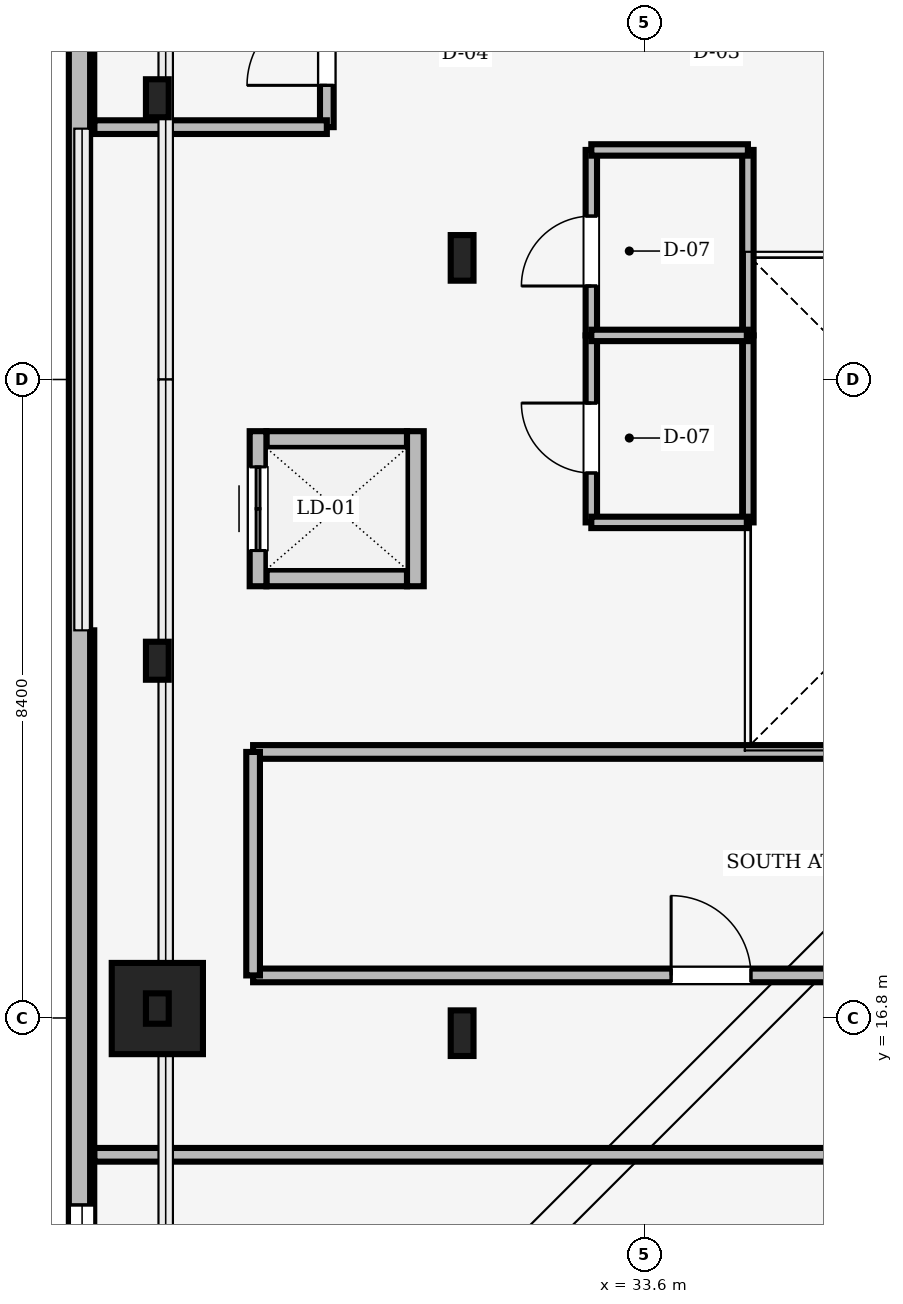
"""IFC4 building model, lengths in metres.
Left out: names, types, materials, properties, quantities, classifications, styles, units other than length and angle.
Written with IfcOpenShell. Run it as: python <this file> out.ifc"""

import sys

from ifc_helpers import new_model, si_unit, direction, frame, frame_2d, origin, origin_2d, place, context, subcontext, project, spatial, rectangle, i_section, extrude, source, transform, mapped, element, fill, save


model = new_model("IFC4")
c1 = context("Model", 3, precision=1e-05, world=origin(), true_north=direction((0.0, 1.0)))
c2 = subcontext(c1, "Body", "Model", "MODEL_VIEW")
j1 = project(units=[si_unit("LENGTHUNIT", "METRE"), si_unit("PLANEANGLEUNIT", "RADIAN")], contexts=[c1])
p1 = place(None, origin())
s1 = spatial("IfcSite", under=j1, at=p1, CompositionType="ELEMENT")
p2 = place(p1, origin())
s2 = spatial("IfcBuilding", under=s1, at=p2, CompositionType="ELEMENT")
p3 = place(p2, frame((0.0, 0.0, 301.15)))
s3 = spatial("IfcBuildingStorey", under=s2, at=p3, CompositionType="ELEMENT", Elevation=301.15)
m1 = source(origin(), c2, "Body", "SweptSolid", [
    extrude(i_section(OverallWidth=0.3, OverallDepth=0.6, WebThickness=0.015, FlangeThickness=0.03, FilletRadius=0.027, at=origin_2d()), origin(), (0.0, 0.0, 1.0), 4.6),
])
for number, where, z_axis, x_axis in (
    (1, (31.2, 16.6, 0.0), (0.0, 0.0, 1.0), (1.0, 0.0, 0.0)),
    (2, (31.2, 26.8, 0.0), (0.0, 0.0, 1.0), (1.0, 0.0, 0.0)),
):
    element("IfcColumn", number, at=place(p3, frame(where, z_axis=z_axis, x_axis=x_axis)), inside=s3, PredefinedType="COLUMN", context=c2, shape_type="MappedRepresentation", body=[
        mapped(m1, transform((0.0, 0.0, 0.0), scale=1.0)),
    ])
m2 = source(origin(), c2, "Body", "SweptSolid", [
    extrude(rectangle(XDim=1.2, YDim=1.2, at=origin_2d()), origin(), (0.0, 0.0, 1.0), 4.6),
])
p4 = place(p3, frame((27.19, 16.924, 0.0), z_axis=(0.0, 0.0, 1.0), x_axis=(1.0, 0.0, 0.0)))
e3 = element("IfcColumn", 3, at=p4, inside=s3, PredefinedType="COLUMN", context=c2, shape_type="MappedRepresentation", body=[
    mapped(m2, transform((0.0, 0.0, 0.0), scale=1.0)),
])
m3 = source(origin(), c2, "Body", "SweptSolid", [
    extrude(i_section(OverallWidth=0.3, OverallDepth=0.5, WebThickness=0.014, FlangeThickness=0.028, FilletRadius=0.027, at=origin_2d()), origin(), (0.0, 0.0, 1.0), 4.6),
])
for number, where, z_axis, x_axis in (
    (4, (27.19, 28.9, 0.0), (0.0, 0.0, 1.0), (1.0, 0.0, 0.0)),
    (5, (27.19, 21.5, 0.0), (0.0, 0.0, 1.0), (1.0, 0.0, 0.0)),
):
    element("IfcColumn", number, at=place(p3, frame(where, z_axis=z_axis, x_axis=x_axis)), inside=s3, PredefinedType="COLUMN", context=c2, shape_type="MappedRepresentation", body=[
        mapped(m3, transform((0.0, 0.0, 0.0), scale=1.0)),
    ])
m4 = source(origin(), c2, "Body", "SweptSolid", [
    extrude(i_section(OverallWidth=0.3, OverallDepth=0.4, WebThickness=0.013, FlangeThickness=0.024, FilletRadius=0.027, at=origin_2d()), origin(), (0.0, 0.0, 1.0), 12.85),
])
p5 = place(p3, frame((27.19, 16.924, 5.0), z_axis=(0.0, 0.0, 1.0), x_axis=(1.0, 0.0, 0.0)))
e6 = element("IfcColumn", 6, at=p5, inside=s3, PredefinedType="COLUMN", context=c2, shape_type="MappedRepresentation", body=[
    mapped(m4, transform((0.0, 0.0, 0.0), scale=1.0)),
])
m5 = source(origin(), c2, "Body", "SweptSolid", [
    extrude(rectangle(XDim=10.493, YDim=0.32, at=frame_2d((5.247, 0.0))), origin(), (0.0, 0.0, 1.0), 4.6),
])
p6 = place(p3, frame((26.2, 38.993, 0.0), z_axis=(0.0, 0.0, 1.0), x_axis=(0.0, -1.0, 0.0)))
e7 = element("IfcWall", 7, at=p6, inside=s3, PredefinedType="SOLIDWALL", context=c2, shape_type="MappedRepresentation", body=[
    mapped(m5, transform((0.0, 0.0, 0.0), scale=1.0)),
])
m6 = source(origin(), c2, "Body", "SweptSolid", [
    extrude(rectangle(XDim=1.4, YDim=2.3, at=frame_2d((0.7, 1.15))), frame((0.0, 0.17, 0.0), z_axis=(0.0, -1.0, 0.0), x_axis=(1.0, 0.0, 0.0)), (0.0, 0.0, 1.0), 0.34),
])
p7 = place(p6, frame((6.465, 0.0, 0.0)))
e8 = element("IfcOpeningElement", 8, at=p7, cuts=e7, PredefinedType="OPENING", context=c2, shape_type="MappedRepresentation", body=[
    mapped(m6, transform((0.0, 0.0, 0.0), scale=1.0)),
])
m7 = source(origin(), c2, "Body", "SweptSolid", [
    extrude(rectangle(XDim=2.4, YDim=3.2, at=frame_2d((1.2, 1.6))), frame((0.0, 0.17, 0.0), z_axis=(0.0, -1.0, 0.0), x_axis=(1.0, 0.0, 0.0)), (0.0, 0.0, 1.0), 0.34),
])
p8 = place(p6, frame((1.884, 0.0, 0.72)))
e9 = element("IfcOpeningElement", 9, at=p8, cuts=e7, PredefinedType="OPENING", context=c2, shape_type="MappedRepresentation", body=[
    mapped(m7, transform((0.0, 0.0, 0.0), scale=1.0)),
])
p9 = place(p3, frame((26.2, 21.9, 0.0), z_axis=(0.0, 0.0, 1.0), x_axis=(0.0, -1.0, 0.0)))
e10 = element("IfcWall", 10, at=p9, inside=s3, PredefinedType="SOLIDWALL", context=c2, shape_type="MappedRepresentation", body=[
    mapped(m5, transform((0.0, 0.0, 0.0), scale=1.0)),
])
p10 = place(p9, frame((7.559, 0.0, 0.72)))
e11 = element("IfcOpeningElement", 11, at=p10, cuts=e10, PredefinedType="OPENING", context=c2, shape_type="MappedRepresentation", body=[
    mapped(m7, transform((0.0, 0.0, 0.0), scale=1.0)),
])
m8 = source(origin(), c2, "Body", "SweptSolid", [
    extrude(rectangle(XDim=27.388, YDim=0.28, at=frame_2d((13.694, 0.0))), origin(), (0.0, 0.0, 1.0), 1.15),
])
p11 = place(p3, frame((26.166, 38.894, 5.0), z_axis=(0.0, 0.0, 1.0), x_axis=(0.0, -1.0, 0.0)))
e12 = element("IfcWall", 12, at=p11, inside=s3, PredefinedType="SOLIDWALL", context=c2, shape_type="MappedRepresentation", body=[
    mapped(m8, transform((0.0, 0.0, 0.0), scale=1.0)),
])
m9 = source(origin(), c2, "Body", "SweptSolid", [
    extrude(rectangle(XDim=1.85, YDim=0.22, at=frame_2d((0.925, 0.0))), origin(), (0.0, 0.0, 1.0), 4.6),
])
for number, where, z_axis, x_axis in (
    (13, (28.625, 22.59, 0.0), (0.0, 0.0, 1.0), (1.0, 0.0, 0.0)),
    (14, (28.625, 24.41, 0.0), (0.0, 0.0, 1.0), (1.0, 0.0, 0.0)),
):
    element("IfcWall", number, at=place(p3, frame(where, z_axis=z_axis, x_axis=x_axis)), inside=s3, PredefinedType="SOLIDWALL", context=c2, shape_type="MappedRepresentation", body=[
        mapped(m9, transform((0.0, 0.0, 0.0), scale=1.0)),
    ])
m10 = source(origin(), c2, "Body", "SweptSolid", [
    extrude(rectangle(XDim=2.04, YDim=0.22, at=frame_2d((1.02, 0.0))), origin(), (0.0, 0.0, 1.0), 4.6),
])
p12 = place(p3, frame((28.515, 22.48, 0.0), z_axis=(0.0, 0.0, 1.0), x_axis=(0.0, 1.0, 0.0)))
e15 = element("IfcWall", 15, at=p12, inside=s3, PredefinedType="SOLIDWALL", context=c2, shape_type="MappedRepresentation", body=[
    mapped(m10, transform((0.0, 0.0, 0.0), scale=1.0)),
])
m11 = source(origin(), c2, "Body", "SweptSolid", [
    extrude(rectangle(XDim=1.1, YDim=2.2, at=frame_2d((0.55, 1.1))), frame((0.0, 0.12, 0.0), z_axis=(0.0, -1.0, 0.0), x_axis=(1.0, 0.0, 0.0)), (0.0, 0.0, 1.0), 0.24),
])
p13 = place(p12, frame((0.47, 0.0, 0.0)))
e16 = element("IfcOpeningElement", 16, at=p13, cuts=e15, PredefinedType="OPENING", context=c2, shape_type="MappedRepresentation", body=[
    mapped(m11, transform((0.0, 0.0, 0.0), scale=1.0)),
])
p14 = place(p3, frame((30.585, 22.48, 0.0), z_axis=(0.0, 0.0, 1.0), x_axis=(0.0, 1.0, 0.0)))
e17 = element("IfcWall", 17, at=p14, inside=s3, PredefinedType="SOLIDWALL", context=c2, shape_type="MappedRepresentation", body=[
    mapped(m10, transform((0.0, 0.0, 0.0), scale=1.0)),
])
m12 = source(origin(), c2, "Body", "SweptSolid", [
    extrude(rectangle(XDim=23.938, YDim=0.18, at=frame_2d((11.969, 0.0))), origin(), (0.0, 0.0, 1.0), 4.142),
])
p15 = place(p3, frame((26.362, 15.0, 0.0), z_axis=(0.0, 0.0, 1.0), x_axis=(1.0, 0.0, 0.0)))
e18 = element("IfcWall", 18, at=p15, inside=s3, PredefinedType="PARTITIONING", context=c2, shape_type="MappedRepresentation", body=[
    mapped(m12, transform((0.0, 0.0, 0.0), scale=1.0)),
])
m13 = source(origin(), c2, "Body", "SweptSolid", [
    extrude(rectangle(XDim=1.05, YDim=2.2, at=frame_2d((0.525, 1.1))), frame((0.0, 0.1, 0.0), z_axis=(0.0, -1.0, 0.0), x_axis=(1.0, 0.0, 0.0)), (0.0, 0.0, 1.0), 0.2),
])
p16 = place(p15, frame((10.523, 0.0, 0.0)))
e19 = element("IfcOpeningElement", 19, at=p16, cuts=e18, PredefinedType="OPENING", context=c2, shape_type="MappedRepresentation", body=[
    mapped(m13, transform((0.0, 0.0, 0.0), scale=1.0)),
])
p17 = place(p15, frame((22.688, 0.0, 0.0)))
e20 = element("IfcOpeningElement", 20, at=p17, cuts=e18, PredefinedType="OPENING", context=c2, shape_type="MappedRepresentation", body=[
    mapped(m13, transform((0.0, 0.0, 0.0), scale=1.0)),
])
m14 = source(origin(), c2, "Body", "SweptSolid", [
    extrude(rectangle(XDim=2.13, YDim=0.18, at=frame_2d((1.065, 0.0))), origin(), (0.0, 0.0, 1.0), 4.6),
])
p18 = place(p3, frame((29.42, 28.52, 0.0), z_axis=(0.0, 0.0, 1.0), x_axis=(0.0, 1.0, 0.0)))
e21 = element("IfcWall", 21, at=p18, inside=s3, PredefinedType="PARTITIONING", context=c2, shape_type="MappedRepresentation", body=[
    mapped(m14, transform((0.0, 0.0, 0.0), scale=1.0)),
])
p19 = place(p18, frame((0.55, 0.0, 0.0)))
e22 = element("IfcOpeningElement", 22, at=p19, cuts=e21, PredefinedType="OPENING", context=c2, shape_type="MappedRepresentation", body=[
    mapped(m13, transform((0.0, 0.0, 0.0), scale=1.0)),
])
m15 = source(origin(), c2, "Body", "SweptSolid", [
    extrude(rectangle(XDim=13.05, YDim=0.18, at=frame_2d((6.525, 0.0))), origin(), (0.0, 0.0, 1.0), 2.792),
])
p20 = place(p3, frame((28.45, 17.36, 0.0), z_axis=(0.0, 0.0, 1.0), x_axis=(1.0, 0.0, 0.0)))
e23 = element("IfcWall", 23, at=p20, inside=s3, PredefinedType="PARTITIONING", context=c2, shape_type="MappedRepresentation", body=[
    mapped(m15, transform((0.0, 0.0, 0.0), scale=1.0)),
])
p21 = place(p20, frame((5.5, 0.0, 0.0)))
e24 = element("IfcOpeningElement", 24, at=p21, cuts=e23, PredefinedType="OPENING", context=c2, shape_type="MappedRepresentation", body=[
    mapped(m13, transform((0.0, 0.0, 0.0), scale=1.0)),
])
m16 = source(origin(), c2, "Body", "SweptSolid", [
    extrude(rectangle(XDim=2.46, YDim=0.15, at=frame_2d((1.23, 0.0))), origin(), (0.0, 0.0, 1.0), 4.6),
])
p22 = place(p3, frame((32.9, 23.32, 0.0), z_axis=(0.0, 0.0, 1.0), x_axis=(0.0, 1.0, 0.0)))
e25 = element("IfcWall", 25, at=p22, inside=s3, PredefinedType="PARTITIONING", context=c2, shape_type="MappedRepresentation", body=[
    mapped(m16, transform((0.0, 0.0, 0.0), scale=1.0)),
])
m17 = source(origin(), c2, "Body", "SweptSolid", [
    extrude(rectangle(XDim=0.92, YDim=2.1, at=frame_2d((0.46, 1.05))), frame((0.0, 0.085, 0.0), z_axis=(0.0, -1.0, 0.0), x_axis=(1.0, 0.0, 0.0)), (0.0, 0.0, 1.0), 0.17),
])
p23 = place(p22, frame((0.65, 0.0, 0.0)))
e26 = element("IfcOpeningElement", 26, at=p23, cuts=e25, PredefinedType="OPENING", context=c2, shape_type="MappedRepresentation", body=[
    mapped(m17, transform((0.0, 0.0, 0.0), scale=1.0)),
])
m18 = source(origin(), c2, "Body", "SweptSolid", [
    extrude(rectangle(XDim=2.44, YDim=0.15, at=frame_2d((1.22, 0.0))), origin(), (0.0, 0.0, 1.0), 4.6),
])
p24 = place(p3, frame((32.9, 25.78, 0.0), z_axis=(0.0, 0.0, 1.0), x_axis=(0.0, 1.0, 0.0)))
e27 = element("IfcWall", 27, at=p24, inside=s3, PredefinedType="PARTITIONING", context=c2, shape_type="MappedRepresentation", body=[
    mapped(m18, transform((0.0, 0.0, 0.0), scale=1.0)),
])
p25 = place(p24, frame((0.65, 0.0, 0.0)))
e28 = element("IfcOpeningElement", 28, at=p25, cuts=e27, PredefinedType="OPENING", context=c2, shape_type="MappedRepresentation", body=[
    mapped(m17, transform((0.0, 0.0, 0.0), scale=1.0)),
])
p26 = place(p3, frame((28.45, 20.3, 0.0), z_axis=(0.0, 0.0, 1.0), x_axis=(1.0, 0.0, 0.0)))
e29 = element("IfcWall", 29, at=p26, inside=s3, PredefinedType="PARTITIONING", context=c2, shape_type="MappedRepresentation", body=[
    mapped(m15, transform((0.0, 0.0, 0.0), scale=1.0)),
])
m19 = source(origin(), c2, "Body", "SweptSolid", [
    extrude(rectangle(XDim=3.058, YDim=0.18, at=frame_2d((1.529, 0.0))), origin(), (0.0, 0.0, 1.0), 4.142),
])
p27 = place(p3, frame((26.362, 28.52, 0.0), z_axis=(0.0, 0.0, 1.0), x_axis=(1.0, 0.0, 0.0)))
e30 = element("IfcWall", 30, at=p27, inside=s3, PredefinedType="PARTITIONING", context=c2, shape_type="MappedRepresentation", body=[
    mapped(m19, transform((0.0, 0.0, 0.0), scale=1.0)),
])
m20 = source(origin(), c2, "Body", "SweptSolid", [
    extrude(rectangle(XDim=2.94, YDim=0.18, at=frame_2d((1.47, 0.0))), origin(), (0.0, 0.0, 1.0), 4.6),
])
p28 = place(p3, frame((28.45, 17.36, 0.0), z_axis=(0.0, 0.0, 1.0), x_axis=(0.0, 1.0, 0.0)))
e31 = element("IfcWall", 31, at=p28, inside=s3, PredefinedType="PARTITIONING", context=c2, shape_type="MappedRepresentation", body=[
    mapped(m20, transform((0.0, 0.0, 0.0), scale=1.0)),
])
p29 = place(p3, frame((34.96, 23.32, 0.0), z_axis=(0.0, 0.0, 1.0), x_axis=(0.0, 1.0, 0.0)))
e32 = element("IfcWall", 32, at=p29, inside=s3, PredefinedType="PARTITIONING", context=c2, shape_type="MappedRepresentation", body=[
    mapped(m16, transform((0.0, 0.0, 0.0), scale=1.0)),
])
p30 = place(p3, frame((34.96, 25.78, 0.0), z_axis=(0.0, 0.0, 1.0), x_axis=(0.0, 1.0, 0.0)))
e33 = element("IfcWall", 33, at=p30, inside=s3, PredefinedType="PARTITIONING", context=c2, shape_type="MappedRepresentation", body=[
    mapped(m18, transform((0.0, 0.0, 0.0), scale=1.0)),
])
m21 = source(origin(), c2, "Body", "SweptSolid", [
    extrude(rectangle(XDim=2.06, YDim=0.15, at=frame_2d((1.03, 0.0))), origin(), (0.0, 0.0, 1.0), 4.6),
])
for number, where, z_axis, x_axis in (
    (34, (32.9, 25.78, 0.0), (0.0, 0.0, 1.0), (1.0, 0.0, 0.0)),
    (35, (32.9, 28.22, 0.0), (0.0, 0.0, 1.0), (1.0, 0.0, 0.0)),
    (36, (32.9, 23.32, 0.0), (0.0, 0.0, 1.0), (1.0, 0.0, 0.0)),
):
    element("IfcWall", number, at=place(p3, frame(where, z_axis=z_axis, x_axis=x_axis)), inside=s3, PredefinedType="PARTITIONING", context=c2, shape_type="MappedRepresentation", body=[
        mapped(m21, transform((0.0, 0.0, 0.0), scale=1.0)),
    ])
m22 = source(origin(), c2, "Body", "SweptSolid", [
    extrude(rectangle(XDim=2.4, YDim=3.2, at=frame_2d((1.2, 1.6))), frame((0.0, 0.03, 0.0), z_axis=(0.0, -1.0, 0.0), x_axis=(1.0, 0.0, 0.0)), (0.0, 0.0, 1.0), 0.06),
])
p31 = place(p10, origin())
e37 = element("IfcWindow", 37, at=p31, inside=s3, PartitioningType="SINGLE_PANEL", PredefinedType="WINDOW", context=c2, shape_type="MappedRepresentation", body=[
    mapped(m22, transform((0.0, 0.0, 0.0), scale=1.0)),
])
fill(e11, e37)
m23 = source(origin(), c2, "Body", "SweptSolid", [
    extrude(rectangle(XDim=1.1, YDim=2.2, at=frame_2d((0.55, 1.1))), frame((0.0, 0.025, 0.0), z_axis=(0.0, -1.0, 0.0), x_axis=(1.0, 0.0, 0.0)), (0.0, 0.0, 1.0), 0.05),
])
p32 = place(p13, origin())
e38 = element("IfcDoor", 38, at=p32, inside=s3, OperationType="DOUBLE_DOOR_SLIDING", PredefinedType="DOOR", context=c2, shape_type="MappedRepresentation", body=[
    mapped(m23, transform((0.0, 0.0, 0.0), scale=1.0)),
])
fill(e16, e38)
m24 = source(origin(), c2, "Body", "SweptSolid", [
    extrude(rectangle(XDim=1.05, YDim=2.2, at=frame_2d((0.525, 1.1))), frame((0.0, 0.025, 0.0), z_axis=(0.0, -1.0, 0.0), x_axis=(1.0, 0.0, 0.0)), (0.0, 0.0, 1.0), 0.05),
])
p33 = place(p19, origin())
e39 = element("IfcDoor", 39, at=p33, inside=s3, OperationType="SINGLE_SWING_LEFT", PredefinedType="DOOR", context=c2, shape_type="MappedRepresentation", body=[
    mapped(m24, transform((0.0, 0.0, 0.0), scale=1.0)),
])
fill(e22, e39)
p34 = place(p21, origin())
e40 = element("IfcDoor", 40, at=p34, inside=s3, OperationType="SINGLE_SWING_LEFT", PredefinedType="DOOR", context=c2, shape_type="MappedRepresentation", body=[
    mapped(m24, transform((0.0, 0.0, 0.0), scale=1.0)),
])
fill(e24, e40)
m25 = source(origin(), c2, "Body", "SweptSolid", [
    extrude(rectangle(XDim=0.92, YDim=2.1, at=frame_2d((0.46, 1.05))), frame((0.0, 0.025, 0.0), z_axis=(0.0, -1.0, 0.0), x_axis=(1.0, 0.0, 0.0)), (0.0, 0.0, 1.0), 0.05),
])
p35 = place(p23, origin())
e41 = element("IfcDoor", 41, at=p35, inside=s3, OperationType="SINGLE_SWING_RIGHT", PredefinedType="DOOR", context=c2, shape_type="MappedRepresentation", body=[
    mapped(m25, transform((0.0, 0.0, 0.0), scale=1.0)),
])
fill(e26, e41)
p36 = place(p25, origin())
e42 = element("IfcDoor", 42, at=p36, inside=s3, OperationType="SINGLE_SWING_LEFT", PredefinedType="DOOR", context=c2, shape_type="MappedRepresentation", body=[
    mapped(m25, transform((0.0, 0.0, 0.0), scale=1.0)),
])
fill(e28, e42)
save(model, sys.argv[1])
